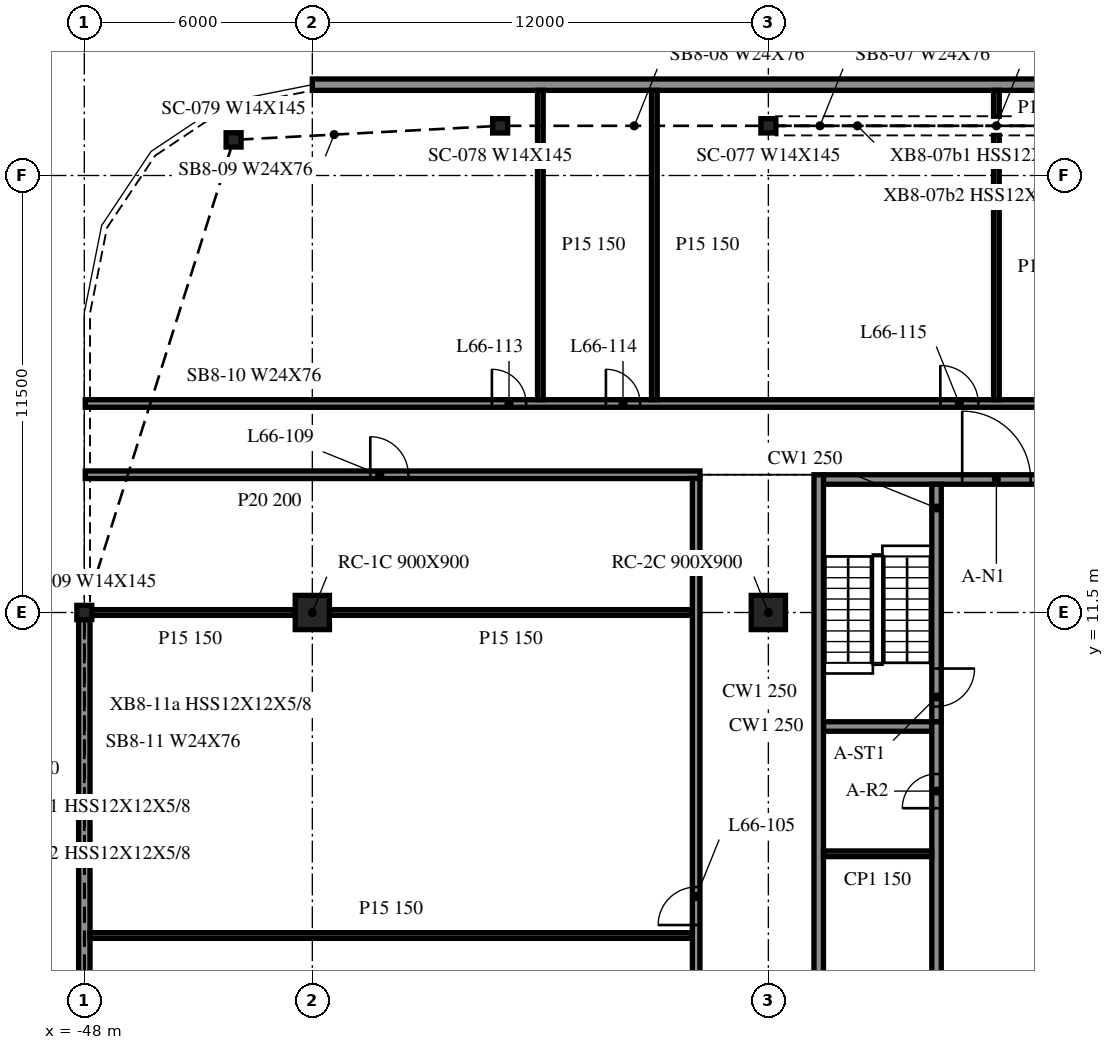
"""IFC4 building model, lengths in metres.
Left out: names, types, materials, properties, quantities, classifications, styles, units other than length and angle.
Written with IfcOpenShell. Run it as: python <this file> out.ifc"""

import sys

from ifc_helpers import new_model, si_unit, direction, frame, frame_2d, origin, origin_2d, place, context, subcontext, project, spatial, rectangle, i_section, extrude, element, fill, save


model = new_model("IFC4")
c1 = context("Model", 3, precision=1e-05, world=origin(), true_north=direction((0.0, 1.0)))
c2 = subcontext(c1, "Body", "Model", "MODEL_VIEW")
j1 = project(units=[si_unit("LENGTHUNIT", "METRE"), si_unit("PLANEANGLEUNIT", "RADIAN")], contexts=[c1])
p1 = place(None, origin())
s1 = spatial("IfcSite", under=j1, at=p1, CompositionType="ELEMENT")
p2 = place(p1, origin())
s2 = spatial("IfcBuilding", under=s1, at=p2, CompositionType="ELEMENT")
p3 = place(p2, frame((0.0, 0.0, 270.9)))
s3 = spatial("IfcBuildingStorey", under=s2, at=p3, CompositionType="ELEMENT", Elevation=270.9)
for number, where, z_axis, x_axis in (
    (1, (-42.0, 11.5, -0.34), (0.0, 0.0, 1.0), (1.0, 0.0, 0.0)),
    (2, (-30.0, 11.5, -0.34), (0.0, 0.0, 1.0), (1.0, 0.0, 0.0)),
):
    element("IfcColumn", number, at=place(p3, frame(where, z_axis=z_axis, x_axis=x_axis)), inside=s3, PredefinedType="COLUMN", context=c2, shape_type="SweptSolid", body=[
        extrude(rectangle(XDim=0.9, YDim=0.9, at=origin_2d()), origin(), (0.0, 0.0, 1.0), 3.8),
    ])
for number, where, z_axis, x_axis in (
    (3, (-30.0, 24.307, -0.34), (0.0, 0.0, 1.0), (1.0, 0.0, 0.0)),
    (4, (-37.058, 24.307, -0.34), (0.0, 0.0, 1.0), (1.0, 0.0, 0.0)),
    (5, (-44.072, 23.937, -0.34), (0.0, 0.0, 1.0), (1.0, 0.0, 0.0)),
    (6, (-48.0, 11.5, -0.34), (0.0, 0.0, 1.0), (1.0, 0.0, 0.0)),
):
    element("IfcColumn", number, at=place(p3, frame(where, z_axis=z_axis, x_axis=x_axis)), inside=s3, PredefinedType="COLUMN", context=c2, shape_type="SweptSolid", body=[
        extrude(i_section(OverallWidth=0.394, OverallDepth=0.376, WebThickness=0.017, FlangeThickness=0.028, at=origin_2d()), origin(), (0.0, 0.0, 1.0), 3.8),
    ])
p4 = place(p3, frame((42.0, 25.39, 0.0), z_axis=(0.0, 0.0, 1.0), x_axis=(-1.0, 0.0, 0.0)))
e7 = element("IfcWall", 7, at=p4, inside=s3, PredefinedType="NOTDEFINED", context=c2, shape_type="SweptSolid", body=[
    extrude(rectangle(XDim=84.0, YDim=0.3, at=frame_2d((42.0, 0.0))), origin(), (0.0, 0.0, 1.0), 2.853),
])
p5 = place(p3, frame((-48.0, 11.312, 0.0), z_axis=(0.0, 0.0, 1.0), x_axis=(0.0, -1.0, 0.0)))
e8 = element("IfcWall", 8, at=p5, inside=s3, PredefinedType="NOTDEFINED", context=c2, shape_type="SweptSolid", body=[
    extrude(rectangle(XDim=11.124, YDim=0.3, at=frame_2d((5.562, 0.0))), origin(), (0.0, 0.0, 1.0), 2.853),
])
p6 = place(p3, frame((-28.675, 15.125, 0.0), z_axis=(0.0, 0.0, 1.0), x_axis=(0.0, -1.0, 0.0)))
e9 = element("IfcWall", 9, at=p6, inside=s3, PredefinedType="SOLIDWALL", context=c2, shape_type="SweptSolid", body=[
    extrude(rectangle(XDim=24.25, YDim=0.25, at=frame_2d((12.125, 0.0))), origin(), (0.0, 0.0, 1.0), 3.46),
])
p7 = place(p3, frame((-28.55, 15.0, 0.0), z_axis=(0.0, 0.0, 1.0), x_axis=(1.0, 0.0, 0.0)))
e10 = element("IfcWall", 10, at=p7, inside=s3, PredefinedType="SOLIDWALL", context=c2, shape_type="SweptSolid", body=[
    extrude(rectangle(XDim=9.1, YDim=0.25, at=frame_2d((4.55, 0.0))), origin(), (0.0, 0.0, 1.0), 3.46),
])
p8 = place(p7, frame((3.65, 0.0, 0.0)))
e11 = element("IfcOpeningElement", 11, at=p8, cuts=e10, PredefinedType="OPENING", context=c2, shape_type="SweptSolid", body=[
    extrude(rectangle(XDim=1.8, YDim=2.1, at=frame_2d((0.9, 1.05))), frame((0.0, 0.135, 0.0), z_axis=(0.0, -1.0, 0.0), x_axis=(1.0, 0.0, 0.0)), (0.0, 0.0, 1.0), 0.27),
])
p9 = place(p3, frame((-25.575, -8.875, 0.0), z_axis=(0.0, 0.0, 1.0), x_axis=(0.0, 1.0, 0.0)))
e12 = element("IfcWall", 12, at=p9, inside=s3, PredefinedType="SOLIDWALL", context=c2, shape_type="SweptSolid", body=[
    extrude(rectangle(XDim=17.5, YDim=0.25, at=frame_2d((8.75, 0.0))), origin(), (0.0, 0.0, 1.0), 3.46),
])
p10 = place(p9, frame((9.775, 0.0, 0.0)))
e13 = element("IfcOpeningElement", 13, at=p10, cuts=e12, PredefinedType="OPENING", context=c2, shape_type="SweptSolid", body=[
    extrude(rectangle(XDim=0.9, YDim=2.1, at=frame_2d((0.45, 1.05))), frame((0.0, 0.135, 0.0), z_axis=(0.0, -1.0, 0.0), x_axis=(1.0, 0.0, 0.0)), (0.0, 0.0, 1.0), 0.27),
])
p11 = place(p9, frame((15.225, 0.0, 0.0)))
e14 = element("IfcOpeningElement", 14, at=p11, cuts=e12, PredefinedType="OPENING", context=c2, shape_type="SweptSolid", body=[
    extrude(rectangle(XDim=0.9, YDim=2.1, at=frame_2d((0.45, 1.05))), frame((0.0, 0.135, 0.0), z_axis=(0.0, -1.0, 0.0), x_axis=(1.0, 0.0, 0.0)), (0.0, 0.0, 1.0), 0.27),
])
p12 = place(p9, frame((0.712, 0.0, 0.0)))
e15 = element("IfcOpeningElement", 15, at=p12, cuts=e12, PredefinedType="OPENING", context=c2, shape_type="SweptSolid", body=[
    extrude(rectangle(XDim=0.9, YDim=2.1, at=frame_2d((0.45, 1.05))), frame((0.0, 0.135, 0.0), z_axis=(0.0, -1.0, 0.0), x_axis=(1.0, 0.0, 0.0)), (0.0, 0.0, 1.0), 0.27),
])
p13 = place(p9, frame((3.788, 0.0, 0.0)))
e16 = element("IfcOpeningElement", 16, at=p13, cuts=e12, PredefinedType="OPENING", context=c2, shape_type="SweptSolid", body=[
    extrude(rectangle(XDim=0.9, YDim=2.1, at=frame_2d((0.45, 1.05))), frame((0.0, 0.135, 0.0), z_axis=(0.0, -1.0, 0.0), x_axis=(1.0, 0.0, 0.0)), (0.0, 0.0, 1.0), 0.27),
])
p14 = place(p3, frame((-25.575, 14.875, 0.0), z_axis=(0.0, 0.0, 1.0), x_axis=(0.0, -1.0, 0.0)))
e17 = element("IfcWall", 17, at=p14, inside=s3, PredefinedType="SOLIDWALL", context=c2, shape_type="SweptSolid", body=[
    extrude(rectangle(XDim=6.25, YDim=0.25, at=frame_2d((3.125, 0.0))), origin(), (0.0, 0.0, 1.0), 3.46),
])
p15 = place(p14, frame((4.85, 0.0, 0.0)))
e18 = element("IfcOpeningElement", 18, at=p15, cuts=e17, PredefinedType="OPENING", context=c2, shape_type="SweptSolid", body=[
    extrude(rectangle(XDim=1.0, YDim=2.1, at=frame_2d((0.5, 1.05))), frame((0.0, 0.135, 0.0), z_axis=(0.0, -1.0, 0.0), x_axis=(1.0, 0.0, 0.0)), (0.0, 0.0, 1.0), 0.27),
])
p16 = place(p3, frame((-28.55, 8.5, 0.0), z_axis=(0.0, 0.0, 1.0), x_axis=(1.0, 0.0, 0.0)))
e19 = element("IfcWall", 19, at=p16, inside=s3, PredefinedType="SOLIDWALL", context=c2, shape_type="SweptSolid", body=[
    extrude(rectangle(XDim=2.85, YDim=0.25, at=frame_2d((1.425, 0.0))), origin(), (0.0, 0.0, 1.0), 3.46),
])
p17 = place(p3, frame((-28.55, 5.15, 0.0), z_axis=(0.0, 0.0, 1.0), x_axis=(1.0, 0.0, 0.0)))
e20 = element("IfcWall", 20, at=p17, inside=s3, PredefinedType="PARTITIONING", context=c2, shape_type="SweptSolid", body=[
    extrude(rectangle(XDim=2.85, YDim=0.15, at=frame_2d((1.425, 0.0))), origin(), (0.0, 0.0, 1.0), 3.46),
])
p18 = place(p3, frame((-47.85, 3.0, 0.0), z_axis=(0.0, 0.0, 1.0), x_axis=(1.0, 0.0, 0.0)))
e21 = element("IfcWall", 21, at=p18, inside=s3, PredefinedType="PARTITIONING", context=c2, shape_type="SweptSolid", body=[
    extrude(rectangle(XDim=15.85, YDim=0.15, at=frame_2d((7.925, 0.0))), origin(), (0.0, 0.0, 1.0), 3.46),
])
p19 = place(p3, frame((-47.975, 11.5, 0.0), z_axis=(0.0, 0.0, 1.0), x_axis=(1.0, 0.0, 0.0)))
e22 = element("IfcWall", 22, at=p19, inside=s3, PredefinedType="PARTITIONING", context=c2, shape_type="SweptSolid", body=[
    extrude(rectangle(XDim=5.525, YDim=0.15, at=frame_2d((2.763, 0.0))), origin(), (0.0, 0.0, 1.0), 3.46),
])
p20 = place(p3, frame((-41.55, 11.5, 0.0), z_axis=(0.0, 0.0, 1.0), x_axis=(1.0, 0.0, 0.0)))
e23 = element("IfcWall", 23, at=p20, inside=s3, PredefinedType="PARTITIONING", context=c2, shape_type="SweptSolid", body=[
    extrude(rectangle(XDim=9.55, YDim=0.15, at=frame_2d((4.775, 0.0))), origin(), (0.0, 0.0, 1.0), 3.46),
])
p21 = place(p3, frame((-47.975, 15.125, 0.0), z_axis=(0.0, 0.0, 1.0), x_axis=(1.0, 0.0, 0.0)))
e24 = element("IfcWall", 24, at=p21, inside=s3, PredefinedType="PARTITIONING", context=c2, shape_type="SweptSolid", body=[
    extrude(rectangle(XDim=16.175, YDim=0.2, at=frame_2d((8.087, 0.0))), origin(), (0.0, 0.0, 1.0), 3.46),
])
p22 = place(p21, frame((7.5, 0.0, 0.0)))
e25 = element("IfcOpeningElement", 25, at=p22, cuts=e24, PredefinedType="OPENING", context=c2, shape_type="SweptSolid", body=[
    extrude(rectangle(XDim=1.0, YDim=2.1, at=frame_2d((0.5, 1.05))), frame((0.0, 0.11, 0.0), z_axis=(0.0, -1.0, 0.0), x_axis=(1.0, 0.0, 0.0)), (0.0, 0.0, 1.0), 0.22),
])
p23 = place(p3, frame((-47.975, 17.0, 0.0), z_axis=(0.0, 0.0, 1.0), x_axis=(1.0, 0.0, 0.0)))
e26 = element("IfcWall", 26, at=p23, inside=s3, PredefinedType="PARTITIONING", context=c2, shape_type="SweptSolid", body=[
    extrude(rectangle(XDim=95.95, YDim=0.2, at=frame_2d((47.975, 0.0))), origin(), (0.0, 0.0, 1.0), 3.46),
])
p24 = place(p23, frame((10.7, 0.0, 0.0)))
e27 = element("IfcOpeningElement", 27, at=p24, cuts=e26, PredefinedType="OPENING", context=c2, shape_type="SweptSolid", body=[
    extrude(rectangle(XDim=0.9, YDim=2.1, at=frame_2d((0.45, 1.05))), frame((0.0, 0.11, 0.0), z_axis=(0.0, -1.0, 0.0), x_axis=(1.0, 0.0, 0.0)), (0.0, 0.0, 1.0), 0.22),
])
p25 = place(p23, frame((13.7, 0.0, 0.0)))
e28 = element("IfcOpeningElement", 28, at=p25, cuts=e26, PredefinedType="OPENING", context=c2, shape_type="SweptSolid", body=[
    extrude(rectangle(XDim=0.9, YDim=2.1, at=frame_2d((0.45, 1.05))), frame((0.0, 0.11, 0.0), z_axis=(0.0, -1.0, 0.0), x_axis=(1.0, 0.0, 0.0)), (0.0, 0.0, 1.0), 0.22),
])
p26 = place(p23, frame((22.5, 0.0, 0.0)))
e29 = element("IfcOpeningElement", 29, at=p26, cuts=e26, PredefinedType="OPENING", context=c2, shape_type="SweptSolid", body=[
    extrude(rectangle(XDim=1.0, YDim=2.1, at=frame_2d((0.5, 1.05))), frame((0.0, 0.11, 0.0), z_axis=(0.0, -1.0, 0.0), x_axis=(1.0, 0.0, 0.0)), (0.0, 0.0, 1.0), 0.22),
])
p27 = place(p23, frame((28.5, 0.0, 0.0)))
e30 = element("IfcOpeningElement", 30, at=p27, cuts=e26, PredefinedType="OPENING", context=c2, shape_type="SweptSolid", body=[
    extrude(rectangle(XDim=1.0, YDim=2.1, at=frame_2d((0.5, 1.05))), frame((0.0, 0.11, 0.0), z_axis=(0.0, -1.0, 0.0), x_axis=(1.0, 0.0, 0.0)), (0.0, 0.0, 1.0), 0.22),
])
p28 = place(p23, frame((40.7, 0.0, 0.0)))
e31 = element("IfcOpeningElement", 31, at=p28, cuts=e26, PredefinedType="OPENING", context=c2, shape_type="SweptSolid", body=[
    extrude(rectangle(XDim=0.9, YDim=2.1, at=frame_2d((0.45, 1.05))), frame((0.0, 0.11, 0.0), z_axis=(0.0, -1.0, 0.0), x_axis=(1.0, 0.0, 0.0)), (0.0, 0.0, 1.0), 0.22),
])
p29 = place(p23, frame((43.5, 0.0, 0.0)))
e32 = element("IfcOpeningElement", 32, at=p29, cuts=e26, PredefinedType="OPENING", context=c2, shape_type="SweptSolid", body=[
    extrude(rectangle(XDim=1.0, YDim=2.1, at=frame_2d((0.5, 1.05))), frame((0.0, 0.11, 0.0), z_axis=(0.0, -1.0, 0.0), x_axis=(1.0, 0.0, 0.0)), (0.0, 0.0, 1.0), 0.22),
])
p30 = place(p23, frame((47.3, 0.0, 0.0)))
e33 = element("IfcOpeningElement", 33, at=p30, cuts=e26, PredefinedType="OPENING", context=c2, shape_type="SweptSolid", body=[
    extrude(rectangle(XDim=0.9, YDim=2.1, at=frame_2d((0.45, 1.05))), frame((0.0, 0.11, 0.0), z_axis=(0.0, -1.0, 0.0), x_axis=(1.0, 0.0, 0.0)), (0.0, 0.0, 1.0), 0.22),
])
p31 = place(p23, frame((54.1, 0.0, 0.0)))
e34 = element("IfcOpeningElement", 34, at=p31, cuts=e26, PredefinedType="OPENING", context=c2, shape_type="SweptSolid", body=[
    extrude(rectangle(XDim=0.9, YDim=2.1, at=frame_2d((0.45, 1.05))), frame((0.0, 0.11, 0.0), z_axis=(0.0, -1.0, 0.0), x_axis=(1.0, 0.0, 0.0)), (0.0, 0.0, 1.0), 0.22),
])
p32 = place(p23, frame((60.1, 0.0, 0.0)))
e35 = element("IfcOpeningElement", 35, at=p32, cuts=e26, PredefinedType="OPENING", context=c2, shape_type="SweptSolid", body=[
    extrude(rectangle(XDim=1.0, YDim=2.1, at=frame_2d((0.5, 1.05))), frame((0.0, 0.11, 0.0), z_axis=(0.0, -1.0, 0.0), x_axis=(1.0, 0.0, 0.0)), (0.0, 0.0, 1.0), 0.22),
])
p33 = place(p23, frame((72.1, 0.0, 0.0)))
e36 = element("IfcOpeningElement", 36, at=p33, cuts=e26, PredefinedType="OPENING", context=c2, shape_type="SweptSolid", body=[
    extrude(rectangle(XDim=1.0, YDim=2.1, at=frame_2d((0.5, 1.05))), frame((0.0, 0.11, 0.0), z_axis=(0.0, -1.0, 0.0), x_axis=(1.0, 0.0, 0.0)), (0.0, 0.0, 1.0), 0.22),
])
p34 = place(p23, frame((75.1, 0.0, 0.0)))
e37 = element("IfcOpeningElement", 37, at=p34, cuts=e26, PredefinedType="OPENING", context=c2, shape_type="SweptSolid", body=[
    extrude(rectangle(XDim=0.9, YDim=2.1, at=frame_2d((0.45, 1.05))), frame((0.0, 0.11, 0.0), z_axis=(0.0, -1.0, 0.0), x_axis=(1.0, 0.0, 0.0)), (0.0, 0.0, 1.0), 0.22),
])
p35 = place(p23, frame((84.1, 0.0, 0.0)))
e38 = element("IfcOpeningElement", 38, at=p35, cuts=e26, PredefinedType="OPENING", context=c2, shape_type="SweptSolid", body=[
    extrude(rectangle(XDim=1.0, YDim=2.1, at=frame_2d((0.5, 1.05))), frame((0.0, 0.11, 0.0), z_axis=(0.0, -1.0, 0.0), x_axis=(1.0, 0.0, 0.0)), (0.0, 0.0, 1.0), 0.22),
])
p36 = place(p23, frame((90.1, 0.0, 0.0)))
e39 = element("IfcOpeningElement", 39, at=p36, cuts=e26, PredefinedType="OPENING", context=c2, shape_type="SweptSolid", body=[
    extrude(rectangle(XDim=0.9, YDim=2.1, at=frame_2d((0.45, 1.05))), frame((0.0, 0.11, 0.0), z_axis=(0.0, -1.0, 0.0), x_axis=(1.0, 0.0, 0.0)), (0.0, 0.0, 1.0), 0.22),
])
for number, where, z_axis, x_axis in (
    (40, (-36.0, 17.1, 0.0), (0.0, 0.0, 1.0), (0.0, 1.0, 0.0)),
    (41, (-33.0, 17.1, 0.0), (0.0, 0.0, 1.0), (0.0, 1.0, 0.0)),
):
    element("IfcWall", number, at=place(p3, frame(where, z_axis=z_axis, x_axis=x_axis)), inside=s3, PredefinedType="PARTITIONING", context=c2, shape_type="SweptSolid", body=[
        extrude(rectangle(XDim=8.14, YDim=0.15, at=frame_2d((4.07, 0.0))), origin(), (0.0, 0.0, 1.0), 3.46),
    ])
p37 = place(p3, frame((-31.9, -9.025, 0.0), z_axis=(0.0, 0.0, 1.0), x_axis=(0.0, 1.0, 0.0)))
e42 = element("IfcWall", 42, at=p37, inside=s3, PredefinedType="PARTITIONING", context=c2, shape_type="SweptSolid", body=[
    extrude(rectangle(XDim=24.05, YDim=0.2, at=frame_2d((12.025, 0.0))), origin(), (0.0, 0.0, 1.0), 3.46),
])
p38 = place(p37, frame((12.3, 0.0, 0.0)))
e43 = element("IfcOpeningElement", 43, at=p38, cuts=e42, PredefinedType="OPENING", context=c2, shape_type="SweptSolid", body=[
    extrude(rectangle(XDim=1.0, YDim=2.1, at=frame_2d((0.5, 1.05))), frame((0.0, 0.11, 0.0), z_axis=(0.0, -1.0, 0.0), x_axis=(1.0, 0.0, 0.0)), (0.0, 0.0, 1.0), 0.22),
])
p39 = place(p3, frame((-24.0, 17.1, 0.0), z_axis=(0.0, 0.0, 1.0), x_axis=(0.0, 1.0, 0.0)))
e44 = element("IfcWall", 44, at=p39, inside=s3, PredefinedType="PARTITIONING", context=c2, shape_type="SweptSolid", body=[
    extrude(rectangle(XDim=6.955, YDim=0.15, at=frame_2d((3.477, 0.0))), origin(), (0.0, 0.0, 1.0), 3.46),
])
p40 = place(p3, frame((-24.0, 24.559, 0.0), z_axis=(0.0, 0.0, 1.0), x_axis=(0.0, 1.0, 0.0)))
e45 = element("IfcWall", 45, at=p40, inside=s3, PredefinedType="PARTITIONING", context=c2, shape_type="SweptSolid", body=[
    extrude(rectangle(XDim=0.681, YDim=0.15, at=frame_2d((0.34, 0.0))), origin(), (0.0, 0.0, 1.0), 3.46),
])
p41 = place(p8, origin())
e46 = element("IfcDoor", 46, at=p41, inside=s3, OperationType="DOUBLE_DOOR_SINGLE_SWING", PredefinedType="DOOR", context=c2, shape_type="SweptSolid", body=[
    extrude(rectangle(XDim=1.8, YDim=2.1, at=frame_2d((0.9, 1.05))), frame((0.0, 0.025, 0.0), z_axis=(0.0, -1.0, 0.0), x_axis=(1.0, 0.0, 0.0)), (0.0, 0.0, 1.0), 0.05),
])
fill(e11, e46)
p42 = place(p11, origin())
e47 = element("IfcDoor", 47, at=p42, inside=s3, OperationType="SINGLE_SWING_RIGHT", PredefinedType="DOOR", context=c2, shape_type="SweptSolid", body=[
    extrude(rectangle(XDim=0.9, YDim=2.1, at=frame_2d((0.45, 1.05))), frame((0.0, 0.025, 0.0), z_axis=(0.0, -1.0, 0.0), x_axis=(1.0, 0.0, 0.0)), (0.0, 0.0, 1.0), 0.05),
])
fill(e14, e47)
p43 = place(p15, origin())
e48 = element("IfcDoor", 48, at=p43, inside=s3, OperationType="SINGLE_SWING_LEFT", PredefinedType="DOOR", context=c2, shape_type="SweptSolid", body=[
    extrude(rectangle(XDim=1.0, YDim=2.1, at=frame_2d((0.5, 1.05))), frame((0.0, 0.025, 0.0), z_axis=(0.0, -1.0, 0.0), x_axis=(1.0, 0.0, 0.0)), (0.0, 0.0, 1.0), 0.05),
])
fill(e18, e48)
p44 = place(p38, origin())
e49 = element("IfcDoor", 49, at=p44, inside=s3, OperationType="SINGLE_SWING_RIGHT", PredefinedType="DOOR", context=c2, shape_type="SweptSolid", body=[
    extrude(rectangle(XDim=1.0, YDim=2.1, at=frame_2d((0.5, 1.05))), frame((0.0, 0.025, 0.0), z_axis=(0.0, -1.0, 0.0), x_axis=(1.0, 0.0, 0.0)), (0.0, 0.0, 1.0), 0.05),
])
fill(e43, e49)
p45 = place(p22, origin())
e50 = element("IfcDoor", 50, at=p45, inside=s3, OperationType="SINGLE_SWING_RIGHT", PredefinedType="DOOR", context=c2, shape_type="SweptSolid", body=[
    extrude(rectangle(XDim=1.0, YDim=2.1, at=frame_2d((0.5, 1.05))), frame((0.0, 0.025, 0.0), z_axis=(0.0, -1.0, 0.0), x_axis=(1.0, 0.0, 0.0)), (0.0, 0.0, 1.0), 0.05),
])
fill(e25, e50)
p46 = place(p24, origin())
e51 = element("IfcDoor", 51, at=p46, inside=s3, OperationType="SINGLE_SWING_LEFT", PredefinedType="DOOR", context=c2, shape_type="SweptSolid", body=[
    extrude(rectangle(XDim=0.9, YDim=2.1, at=frame_2d((0.45, 1.05))), frame((0.0, 0.025, 0.0), z_axis=(0.0, -1.0, 0.0), x_axis=(1.0, 0.0, 0.0)), (0.0, 0.0, 1.0), 0.05),
])
fill(e27, e51)
p47 = place(p25, origin())
e52 = element("IfcDoor", 52, at=p47, inside=s3, OperationType="SINGLE_SWING_LEFT", PredefinedType="DOOR", context=c2, shape_type="SweptSolid", body=[
    extrude(rectangle(XDim=0.9, YDim=2.1, at=frame_2d((0.45, 1.05))), frame((0.0, 0.025, 0.0), z_axis=(0.0, -1.0, 0.0), x_axis=(1.0, 0.0, 0.0)), (0.0, 0.0, 1.0), 0.05),
])
fill(e28, e52)
p48 = place(p26, origin())
e53 = element("IfcDoor", 53, at=p48, inside=s3, OperationType="SINGLE_SWING_LEFT", PredefinedType="DOOR", context=c2, shape_type="SweptSolid", body=[
    extrude(rectangle(XDim=1.0, YDim=2.1, at=frame_2d((0.5, 1.05))), frame((0.0, 0.025, 0.0), z_axis=(0.0, -1.0, 0.0), x_axis=(1.0, 0.0, 0.0)), (0.0, 0.0, 1.0), 0.05),
])
fill(e29, e53)
save(model, sys.argv[1])
